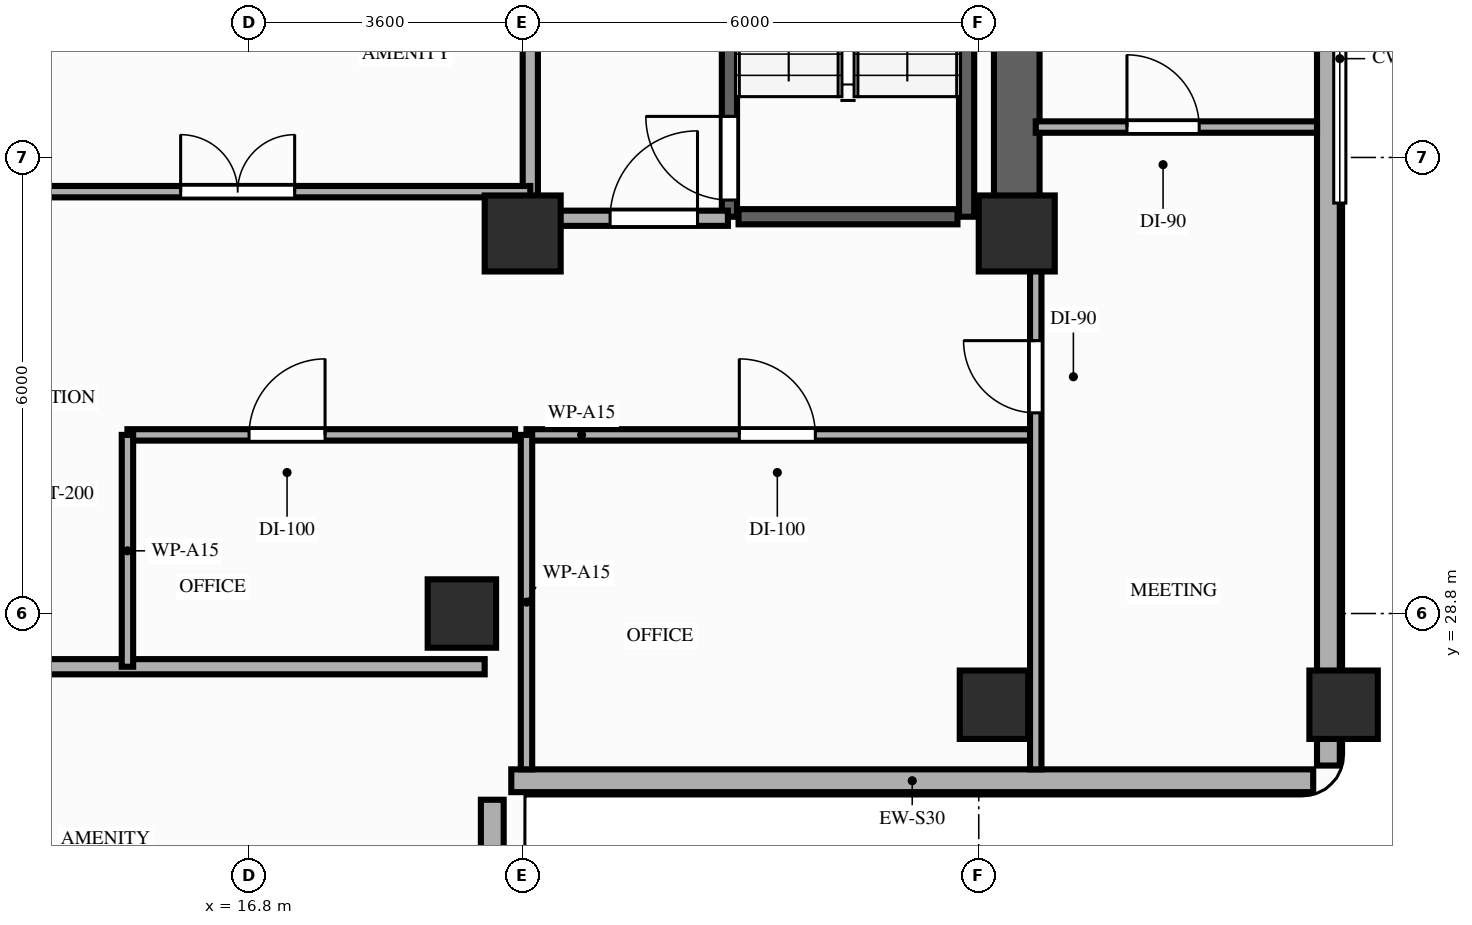
"""IFC4 building model, lengths in metres.
Left out: names, types, materials, properties, quantities, classifications, styles, units other than length and angle.
Written with IfcOpenShell. Run it as: python <this file> out.ifc"""

import sys

from ifc_helpers import new_model, si_unit, direction, frame, frame_2d, origin, origin_2d, place, context, subcontext, project, spatial, rectangle, extrude, element, fill, save


model = new_model("IFC4")
c1 = context("Model", 3, precision=1e-05, world=origin(), true_north=direction((0.0, 1.0)))
c2 = subcontext(c1, "Body", "Model", "MODEL_VIEW")
j1 = project(units=[si_unit("LENGTHUNIT", "METRE"), si_unit("PLANEANGLEUNIT", "RADIAN")], contexts=[c1])
p1 = place(None, origin())
s1 = spatial("IfcSite", under=j1, at=p1, CompositionType="ELEMENT")
p2 = place(p1, origin())
s2 = spatial("IfcBuilding", under=s1, at=p2, CompositionType="ELEMENT")
p3 = place(p2, frame((0.0, 0.0, 166.4)))
s3 = spatial("IfcBuildingStorey", under=s2, at=p3, CompositionType="ELEMENT", Elevation=166.4)
for number, where, z_axis, x_axis in (
    (1, (20.4, 33.8, 0.0), (0.0, 0.0, 1.0), (1.0, 0.0, 0.0)),
    (2, (26.9, 33.8, 0.0), (0.0, 0.0, 1.0), (1.0, 0.0, 0.0)),
):
    element("IfcColumn", number, at=place(p3, frame(where, z_axis=z_axis, x_axis=x_axis)), inside=s3, PredefinedType="COLUMN", context=c2, shape_type="SweptSolid", body=[
        extrude(rectangle(XDim=1.0, YDim=1.0, at=origin_2d()), origin(), (0.0, 0.0, 1.0), 3.2),
    ])
for number, where, z_axis, x_axis in (
    (3, (19.6, 28.8, 0.0), (0.0, 0.0, 1.0), (1.0, 0.0, 0.0)),
    (4, (26.6, 27.6, 0.0), (0.0, 0.0, 1.0), (1.0, 0.0, 0.0)),
    (5, (31.2, 27.6, 0.0), (0.0, 0.0, 1.0), (1.0, 0.0, 0.0)),
):
    element("IfcColumn", number, at=place(p3, frame(where, z_axis=z_axis, x_axis=x_axis)), inside=s3, PredefinedType="COLUMN", context=c2, shape_type="SweptSolid", body=[
        extrude(rectangle(XDim=0.9, YDim=0.9, at=origin_2d()), origin(), (0.0, 0.0, 1.0), 3.2),
    ])
p4 = place(p3, frame((20.0, 8.8, 0.0), z_axis=(0.0, 0.0, 1.0), x_axis=(0.0, 1.0, 0.0)))
e6 = element("IfcWall", 6, at=p4, inside=s3, PredefinedType="STANDARD", context=c2, shape_type="SweptSolid", body=[
    extrude(rectangle(XDim=17.55, YDim=0.3, at=frame_2d((8.775, 0.0))), origin(), (0.0, 0.0, 1.0), 2.45),
])
p5 = place(p4, frame((4.58, 0.0, 0.85)))
e7 = element("IfcOpeningElement", 7, at=p5, cuts=e6, PredefinedType="OPENING", context=c2, shape_type="SweptSolid", body=[
    extrude(rectangle(XDim=0.8, YDim=1.35, at=frame_2d((0.4, 0.675))), frame((0.0, 0.16, 0.0), z_axis=(0.0, -1.0, 0.0), x_axis=(1.0, 0.0, 0.0)), (0.0, 0.0, 1.0), 0.32),
])
p6 = place(p4, frame((10.85, 0.0, 0.85)))
e8 = element("IfcOpeningElement", 8, at=p6, cuts=e6, PredefinedType="OPENING", context=c2, shape_type="SweptSolid", body=[
    extrude(rectangle(XDim=2.1, YDim=1.35, at=frame_2d((1.05, 0.675))), frame((0.0, 0.16, 0.0), z_axis=(0.0, -1.0, 0.0), x_axis=(1.0, 0.0, 0.0)), (0.0, 0.0, 1.0), 0.32),
])
p7 = place(p3, frame((20.25, 26.6, 0.0), z_axis=(0.0, 0.0, 1.0), x_axis=(1.0, 0.0, 0.0)))
e9 = element("IfcWall", 9, at=p7, inside=s3, PredefinedType="STANDARD", context=c2, shape_type="SweptSolid", body=[
    extrude(rectangle(XDim=10.55, YDim=0.3, at=frame_2d((5.275, 0.0))), origin(), (0.0, 0.0, 1.0), 3.02),
])
p8 = place(p3, frame((31.0, 26.8, 0.0), z_axis=(0.0, 0.0, 1.0), x_axis=(0.0, 1.0, 0.0)))
e10 = element("IfcWall", 10, at=p8, inside=s3, PredefinedType="STANDARD", context=c2, shape_type="SweptSolid", body=[
    extrude(rectangle(XDim=15.35, YDim=0.3, at=frame_2d((7.675, 0.0))), origin(), (0.0, 0.0, 1.0), 2.45),
])
p9 = place(p3, frame((26.9, 33.8, 0.0), z_axis=(0.0, 0.0, 1.0), x_axis=(0.0, 1.0, 0.0)))
e11 = element("IfcWall", 11, at=p9, inside=s3, PredefinedType="SHEAR", context=c2, shape_type="SweptSolid", body=[
    extrude(rectangle(XDim=7.95, YDim=0.6, at=frame_2d((3.975, 0.0))), origin(), (0.0, 0.0, 1.0), 3.02),
])
p10 = place(p3, frame((23.12, 34.02, 0.0), z_axis=(0.0, 0.0, 1.0), x_axis=(0.0, 1.0, 0.0)))
e12 = element("IfcWall", 12, at=p10, inside=s3, PredefinedType="SHEAR", context=c2, shape_type="SweptSolid", body=[
    extrude(rectangle(XDim=7.78, YDim=0.2, at=frame_2d((3.89, 0.0))), origin(), (0.0, 0.0, 1.0), 3.02),
])
p11 = place(p10, frame((0.22, 0.0, 0.0)))
e13 = element("IfcOpeningElement", 13, at=p11, cuts=e12, PredefinedType="OPENING", context=c2, shape_type="SweptSolid", body=[
    extrude(rectangle(XDim=1.1, YDim=2.15, at=frame_2d((0.55, 1.075))), frame((0.0, 0.11, 0.0), z_axis=(0.0, -1.0, 0.0), x_axis=(1.0, 0.0, 0.0)), (0.0, 0.0, 1.0), 0.22),
])
p12 = place(p3, frame((26.24, 34.02, 0.0), z_axis=(0.0, 0.0, 1.0), x_axis=(0.0, 1.0, 0.0)))
e14 = element("IfcWall", 14, at=p12, inside=s3, PredefinedType="SHEAR", context=c2, shape_type="SweptSolid", body=[
    extrude(rectangle(XDim=7.78, YDim=0.2, at=frame_2d((3.89, 0.0))), origin(), (0.0, 0.0, 1.0), 3.02),
])
p13 = place(p3, frame((23.24, 34.02, 0.0), z_axis=(0.0, 0.0, 1.0), x_axis=(1.0, 0.0, 0.0)))
e15 = element("IfcWall", 15, at=p13, inside=s3, PredefinedType="SHEAR", context=c2, shape_type="SweptSolid", body=[
    extrude(rectangle(XDim=2.88, YDim=0.2, at=frame_2d((1.44, 0.0))), origin(), (0.0, 0.0, 1.0), 3.02),
])
p14 = place(p3, frame((20.5, 34.0, 0.0), z_axis=(0.0, 0.0, 1.0), x_axis=(0.0, 1.0, 0.0)))
e16 = element("IfcWall", 16, at=p14, inside=s3, PredefinedType="PARTITIONING", context=c2, shape_type="SweptSolid", body=[
    extrude(rectangle(XDim=5.45, YDim=0.2, at=frame_2d((2.725, 0.0))), origin(), (0.0, 0.0, 1.0), 2.45),
])
p15 = place(p3, frame((20.5, 34.0, 0.0), z_axis=(0.0, 0.0, 1.0), x_axis=(1.0, 0.0, 0.0)))
e17 = element("IfcWall", 17, at=p15, inside=s3, PredefinedType="PARTITIONING", context=c2, shape_type="SweptSolid", body=[
    extrude(rectangle(XDim=2.6, YDim=0.2, at=frame_2d((1.3, 0.0))), origin(), (0.0, 0.0, 1.0), 2.45),
])
p16 = place(p15, frame((1.05, 0.0, 0.0)))
e18 = element("IfcOpeningElement", 18, at=p16, cuts=e17, PredefinedType="OPENING", context=c2, shape_type="SweptSolid", body=[
    extrude(rectangle(XDim=1.15, YDim=2.15, at=frame_2d((0.575, 1.075))), frame((0.0, 0.11, 0.0), z_axis=(0.0, -1.0, 0.0), x_axis=(1.0, 0.0, 0.0)), (0.0, 0.0, 1.0), 0.22),
])
p17 = place(p3, frame((12.9, 34.35, 0.0), z_axis=(0.0, 0.0, 1.0), x_axis=(1.0, 0.0, 0.0)))
e19 = element("IfcWall", 19, at=p17, inside=s3, PredefinedType="PARTITIONING", context=c2, shape_type="SweptSolid", body=[
    extrude(rectangle(XDim=7.6, YDim=0.15, at=frame_2d((3.8, 0.0))), origin(), (0.0, 0.0, 1.0), 3.02),
])
p18 = place(p17, frame((3.0, 0.0, 0.0)))
e20 = element("IfcOpeningElement", 20, at=p18, cuts=e19, PredefinedType="OPENING", context=c2, shape_type="SweptSolid", body=[
    extrude(rectangle(XDim=1.5, YDim=2.15, at=frame_2d((0.75, 1.075))), frame((0.0, 0.085, 0.0), z_axis=(0.0, -1.0, 0.0), x_axis=(1.0, 0.0, 0.0)), (0.0, 0.0, 1.0), 0.17),
])
p19 = place(p3, frame((8.98, 28.1, 0.0), z_axis=(0.0, 0.0, 1.0), x_axis=(1.0, 0.0, 0.0)))
e21 = element("IfcWall", 21, at=p19, inside=s3, PredefinedType="PARTITIONING", context=c2, shape_type="SweptSolid", body=[
    extrude(rectangle(XDim=10.92, YDim=0.2, at=frame_2d((5.46, 0.0))), origin(), (0.0, 0.0, 1.0), 2.45),
])
p20 = place(p3, frame((15.2, 31.15, 0.0), z_axis=(0.0, 0.0, 1.0), x_axis=(1.0, 0.0, 0.0)))
e22 = element("IfcWall", 22, at=p20, inside=s3, PredefinedType="PARTITIONING", context=c2, shape_type="SweptSolid", body=[
    extrude(rectangle(XDim=5.1, YDim=0.15, at=frame_2d((2.55, 0.0))), origin(), (0.0, 0.0, 1.0), 2.45),
])
p21 = place(p20, frame((1.6, 0.0, 0.0)))
e23 = element("IfcOpeningElement", 23, at=p21, cuts=e22, PredefinedType="OPENING", context=c2, shape_type="SweptSolid", body=[
    extrude(rectangle(XDim=1.0, YDim=2.15, at=frame_2d((0.5, 1.075))), frame((0.0, 0.085, 0.0), z_axis=(0.0, -1.0, 0.0), x_axis=(1.0, 0.0, 0.0)), (0.0, 0.0, 1.0), 0.17),
])
p22 = place(p3, frame((15.2, 28.1, 0.0), z_axis=(0.0, 0.0, 1.0), x_axis=(0.0, 1.0, 0.0)))
e24 = element("IfcWall", 24, at=p22, inside=s3, PredefinedType="PARTITIONING", context=c2, shape_type="SweptSolid", body=[
    extrude(rectangle(XDim=3.05, YDim=0.15, at=frame_2d((1.525, 0.0))), origin(), (0.0, 0.0, 1.0), 2.45),
])
p23 = place(p3, frame((20.45, 31.15, 0.0), z_axis=(0.0, 0.0, 1.0), x_axis=(1.0, 0.0, 0.0)))
e25 = element("IfcWall", 25, at=p23, inside=s3, PredefinedType="PARTITIONING", context=c2, shape_type="SweptSolid", body=[
    extrude(rectangle(XDim=6.7, YDim=0.15, at=frame_2d((3.35, 0.0))), origin(), (0.0, 0.0, 1.0), 3.02),
])
p24 = place(p23, frame((2.8, 0.0, 0.0)))
e26 = element("IfcOpeningElement", 26, at=p24, cuts=e25, PredefinedType="OPENING", context=c2, shape_type="SweptSolid", body=[
    extrude(rectangle(XDim=1.0, YDim=2.15, at=frame_2d((0.5, 1.075))), frame((0.0, 0.085, 0.0), z_axis=(0.0, -1.0, 0.0), x_axis=(1.0, 0.0, 0.0)), (0.0, 0.0, 1.0), 0.17),
])
p25 = place(p3, frame((20.45, 26.75, 0.0), z_axis=(0.0, 0.0, 1.0), x_axis=(0.0, 1.0, 0.0)))
e27 = element("IfcWall", 27, at=p25, inside=s3, PredefinedType="PARTITIONING", context=c2, shape_type="SweptSolid", body=[
    extrude(rectangle(XDim=4.4, YDim=0.15, at=frame_2d((2.2, 0.0))), origin(), (0.0, 0.0, 1.0), 2.45),
])
p26 = place(p3, frame((27.15, 26.75, 0.0), z_axis=(0.0, 0.0, 1.0), x_axis=(0.0, 1.0, 0.0)))
e28 = element("IfcWall", 28, at=p26, inside=s3, PredefinedType="PARTITIONING", context=c2, shape_type="SweptSolid", body=[
    extrude(rectangle(XDim=6.93, YDim=0.15, at=frame_2d((3.465, 0.0))), origin(), (0.0, 0.0, 1.0), 2.45),
])
p27 = place(p26, frame((4.69, 0.0, 0.0)))
e29 = element("IfcOpeningElement", 29, at=p27, cuts=e28, PredefinedType="OPENING", context=c2, shape_type="SweptSolid", body=[
    extrude(rectangle(XDim=0.95, YDim=2.15, at=frame_2d((0.475, 1.075))), frame((0.0, 0.085, 0.0), z_axis=(0.0, -1.0, 0.0), x_axis=(1.0, 0.0, 0.0)), (0.0, 0.0, 1.0), 0.17),
])
p28 = place(p3, frame((27.15, 35.2, 0.0), z_axis=(0.0, 0.0, 1.0), x_axis=(1.0, 0.0, 0.0)))
e30 = element("IfcWall", 30, at=p28, inside=s3, PredefinedType="PARTITIONING", context=c2, shape_type="SweptSolid", body=[
    extrude(rectangle(XDim=3.7, YDim=0.15, at=frame_2d((1.85, 0.0))), origin(), (0.0, 0.0, 1.0), 2.45),
])
p29 = place(p28, frame((1.2, 0.0, 0.0)))
e31 = element("IfcOpeningElement", 31, at=p29, cuts=e30, PredefinedType="OPENING", context=c2, shape_type="SweptSolid", body=[
    extrude(rectangle(XDim=0.95, YDim=2.15, at=frame_2d((0.475, 1.075))), frame((0.0, 0.085, 0.0), z_axis=(0.0, -1.0, 0.0), x_axis=(1.0, 0.0, 0.0)), (0.0, 0.0, 1.0), 0.17),
])
p30 = place(p11, origin())
e32 = element("IfcDoor", 32, at=p30, inside=s3, OperationType="SINGLE_SWING_RIGHT", PredefinedType="DOOR", context=c2, shape_type="SweptSolid", body=[
    extrude(rectangle(XDim=1.1, YDim=2.15, at=frame_2d((0.55, 1.075))), frame((0.0, 0.025, 0.0), z_axis=(0.0, -1.0, 0.0), x_axis=(1.0, 0.0, 0.0)), (0.0, 0.0, 1.0), 0.05),
])
fill(e13, e32)
p31 = place(p16, origin())
e33 = element("IfcDoor", 33, at=p31, inside=s3, OperationType="SINGLE_SWING_RIGHT", PredefinedType="DOOR", context=c2, shape_type="SweptSolid", body=[
    extrude(rectangle(XDim=1.15, YDim=2.15, at=frame_2d((0.575, 1.075))), frame((0.0, 0.025, 0.0), z_axis=(0.0, -1.0, 0.0), x_axis=(1.0, 0.0, 0.0)), (0.0, 0.0, 1.0), 0.05),
])
fill(e18, e33)
p32 = place(p18, origin())
e34 = element("IfcDoor", 34, at=p32, inside=s3, OperationType="DOUBLE_DOOR_SINGLE_SWING", PredefinedType="DOOR", context=c2, shape_type="SweptSolid", body=[
    extrude(rectangle(XDim=1.5, YDim=2.15, at=frame_2d((0.75, 1.075))), frame((0.0, 0.025, 0.0), z_axis=(0.0, -1.0, 0.0), x_axis=(1.0, 0.0, 0.0)), (0.0, 0.0, 1.0), 0.05),
])
fill(e20, e34)
p33 = place(p21, origin())
e35 = element("IfcDoor", 35, at=p33, inside=s3, OperationType="SINGLE_SWING_RIGHT", PredefinedType="DOOR", context=c2, shape_type="SweptSolid", body=[
    extrude(rectangle(XDim=1.0, YDim=2.15, at=frame_2d((0.5, 1.075))), frame((0.0, 0.025, 0.0), z_axis=(0.0, -1.0, 0.0), x_axis=(1.0, 0.0, 0.0)), (0.0, 0.0, 1.0), 0.05),
])
fill(e23, e35)
p34 = place(p24, origin())
e36 = element("IfcDoor", 36, at=p34, inside=s3, OperationType="SINGLE_SWING_LEFT", PredefinedType="DOOR", context=c2, shape_type="SweptSolid", body=[
    extrude(rectangle(XDim=1.0, YDim=2.15, at=frame_2d((0.5, 1.075))), frame((0.0, 0.025, 0.0), z_axis=(0.0, -1.0, 0.0), x_axis=(1.0, 0.0, 0.0)), (0.0, 0.0, 1.0), 0.05),
])
fill(e26, e36)
p35 = place(p27, origin())
e37 = element("IfcDoor", 37, at=p35, inside=s3, OperationType="SINGLE_SWING_RIGHT", PredefinedType="DOOR", context=c2, shape_type="SweptSolid", body=[
    extrude(rectangle(XDim=0.95, YDim=2.15, at=frame_2d((0.475, 1.075))), frame((0.0, 0.025, 0.0), z_axis=(0.0, -1.0, 0.0), x_axis=(1.0, 0.0, 0.0)), (0.0, 0.0, 1.0), 0.05),
])
fill(e29, e37)
p36 = place(p29, origin())
e38 = element("IfcDoor", 38, at=p36, inside=s3, OperationType="SINGLE_SWING_LEFT", PredefinedType="DOOR", context=c2, shape_type="SweptSolid", body=[
    extrude(rectangle(XDim=0.95, YDim=2.15, at=frame_2d((0.475, 1.075))), frame((0.0, 0.025, 0.0), z_axis=(0.0, -1.0, 0.0), x_axis=(1.0, 0.0, 0.0)), (0.0, 0.0, 1.0), 0.05),
])
fill(e31, e38)
save(model, sys.argv[1])
